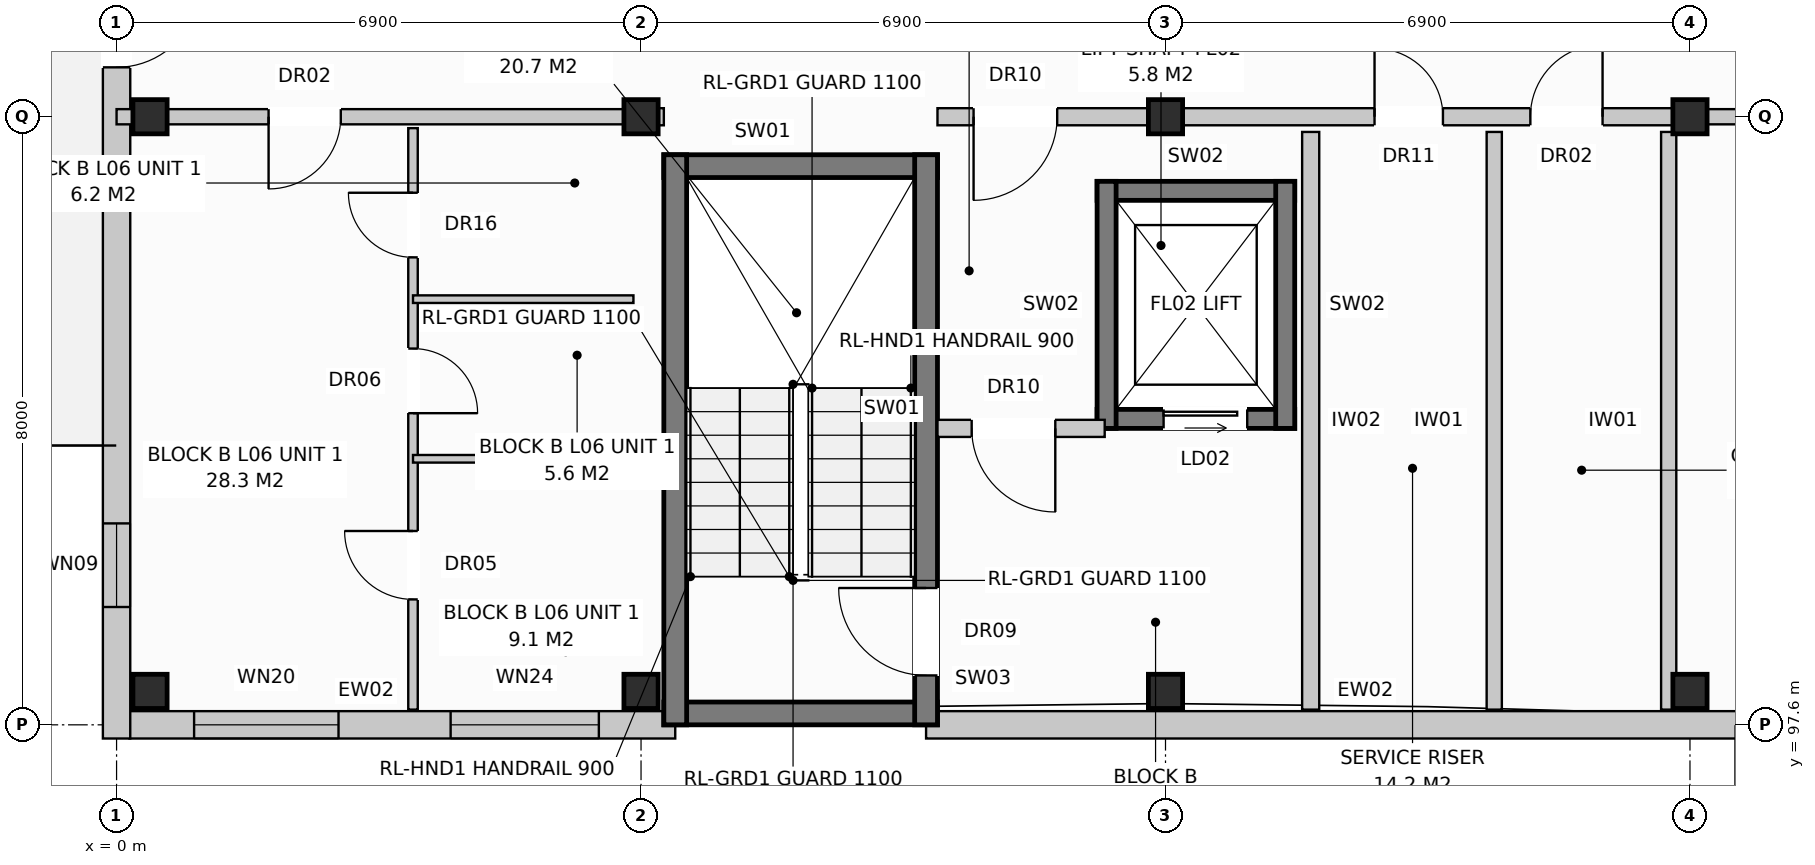
"""IFC4 building model, lengths in metres.
Left out: names, types, materials, properties, quantities, classifications, styles, units other than length and angle.
Written with IfcOpenShell. Run it as: python <this file> out.ifc"""

import sys

from ifc_helpers import new_model, si_unit, direction, frame, frame_2d, origin, origin_with_axes, origin_2d, place, context, subcontext, project, spatial, rectangle, extrude, element, fill, save


model = new_model("IFC4")
c1 = context("Model", 3, precision=1e-05, world=origin(), true_north=direction((0.0, 1.0)))
c2 = subcontext(c1, "Body", "Model", "MODEL_VIEW")
j1 = project(units=[si_unit("LENGTHUNIT", "METRE"), si_unit("PLANEANGLEUNIT", "RADIAN")], contexts=[c1])
p1 = place(None, origin())
s1 = spatial("IfcSite", under=j1, at=p1, CompositionType="ELEMENT")
p2 = place(p1, origin())
s2 = spatial("IfcBuilding", under=s1, at=p2, CompositionType="ELEMENT")
p3 = place(p2, frame((0.0, 0.0, 20.8)))
s3 = spatial("IfcBuildingStorey", under=s2, at=p3, CompositionType="ELEMENT", Elevation=20.8)
for number, where, z_axis, x_axis in (
    (1, (0.44, 98.04, 0.0), (0.0, 0.0, 1.0), (1.0, 0.0, 0.0)),
    (2, (0.44, 105.6, 0.0), (0.0, 0.0, 1.0), (1.0, 0.0, 0.0)),
    (3, (6.9, 98.04, 0.0), (0.0, 0.0, 1.0), (1.0, 0.0, 0.0)),
    (4, (6.9, 105.6, 0.0), (0.0, 0.0, 1.0), (1.0, 0.0, 0.0)),
    (5, (13.8, 98.04, 0.0), (0.0, 0.0, 1.0), (1.0, 0.0, 0.0)),
    (6, (13.8, 105.6, 0.0), (0.0, 0.0, 1.0), (1.0, 0.0, 0.0)),
    (7, (20.7, 98.04, 0.0), (0.0, 0.0, 1.0), (1.0, 0.0, 0.0)),
    (8, (20.7, 105.6, 0.0), (0.0, 0.0, 1.0), (1.0, 0.0, 0.0)),
):
    element("IfcColumn", number, at=place(p3, frame(where, z_axis=z_axis, x_axis=x_axis)), inside=s3, PredefinedType="COLUMN", context=c2, shape_type="SweptSolid", body=[
        extrude(rectangle(XDim=0.45, YDim=0.45, at=origin_2d()), origin(), (0.0, 0.0, 1.0), 3.2),
    ])
p4 = place(p3, frame((0.17, 97.6, 0.0), z_axis=(0.0, 0.0, 1.0), x_axis=(1.0, 0.0, 0.0)))
e9 = element("IfcWall", 9, at=p4, inside=s3, PredefinedType="STANDARD", context=c2, shape_type="SweptSolid", body=[
    extrude(rectangle(XDim=7.18, YDim=0.36, at=frame_2d((3.59, 0.0))), origin(), (0.0, 0.0, 1.0), 2.95),
])
p5 = place(p4, frame((0.85, 0.0, 0.8)))
e10 = element("IfcOpeningElement", 10, at=p5, cuts=e9, PredefinedType="OPENING", context=c2, shape_type="SweptSolid", body=[
    extrude(rectangle(XDim=1.9, YDim=1.85, at=frame_2d((0.95, 0.925))), frame((0.0, 0.192, 0.0), z_axis=(0.0, -1.0, 0.0), x_axis=(1.0, 0.0, 0.0)), (0.0, 0.0, 1.0), 0.384),
])
p6 = place(p4, frame((4.225, 0.0, 0.8)))
e11 = element("IfcOpeningElement", 11, at=p6, cuts=e9, PredefinedType="OPENING", context=c2, shape_type="SweptSolid", body=[
    extrude(rectangle(XDim=1.95, YDim=1.65, at=frame_2d((0.975, 0.825))), frame((0.0, 0.192, 0.0), z_axis=(0.0, -1.0, 0.0), x_axis=(1.0, 0.0, 0.0)), (0.0, 0.0, 1.0), 0.384),
])
p7 = place(p3, frame((10.65, 97.6, 0.0), z_axis=(0.0, 0.0, 1.0), x_axis=(1.0, 0.0, 0.0)))
e12 = element("IfcWall", 12, at=p7, inside=s3, PredefinedType="STANDARD", context=c2, shape_type="SweptSolid", body=[
    extrude(rectangle(XDim=17.4, YDim=0.36, at=frame_2d((8.7, 0.0))), origin(), (0.0, 0.0, 1.0), 2.95),
])
p8 = place(p7, frame((11.87, 0.0, 0.0)))
e13 = element("IfcOpeningElement", 13, at=p8, cuts=e12, PredefinedType="OPENING", context=c2, shape_type="SweptSolid", body=[
    extrude(rectangle(XDim=0.95, YDim=2.1, at=frame_2d((0.475, 1.05))), frame((0.0, 0.192, 0.0), z_axis=(0.0, -1.0, 0.0), x_axis=(1.0, 0.0, 0.0)), (0.0, 0.0, 1.0), 0.384),
])
p9 = place(p7, frame((14.87, 0.0, 0.72)))
e14 = element("IfcOpeningElement", 14, at=p9, cuts=e12, PredefinedType="OPENING", context=c2, shape_type="SweptSolid", body=[
    extrude(rectangle(XDim=1.1, YDim=1.5, at=frame_2d((0.55, 0.75))), frame((0.0, 0.192, 0.0), z_axis=(0.0, -1.0, 0.0), x_axis=(1.0, 0.0, 0.0)), (0.0, 0.0, 1.0), 0.384),
])
p10 = place(p3, frame((0.0, 97.42, 0.0), z_axis=(0.0, 0.0, 1.0), x_axis=(0.0, 1.0, 0.0)))
e15 = element("IfcWall", 15, at=p10, inside=s3, PredefinedType="STANDARD", context=c2, shape_type="SweptSolid", body=[
    extrude(rectangle(XDim=18.76, YDim=0.36, at=frame_2d((9.38, 0.0))), origin(), (0.0, 0.0, 1.0), 2.95),
])
p11 = place(p10, frame((8.83, 0.0, 0.0)))
e16 = element("IfcOpeningElement", 16, at=p11, cuts=e15, PredefinedType="OPENING", context=c2, shape_type="SweptSolid", body=[
    extrude(rectangle(XDim=1.1, YDim=2.1, at=frame_2d((0.55, 1.05))), frame((0.0, 0.192, 0.0), z_axis=(0.0, -1.0, 0.0), x_axis=(1.0, 0.0, 0.0)), (0.0, 0.0, 1.0), 0.384),
])
p12 = place(p10, frame((1.73, 0.0, 0.72)))
e17 = element("IfcOpeningElement", 17, at=p12, cuts=e15, PredefinedType="OPENING", context=c2, shape_type="SweptSolid", body=[
    extrude(rectangle(XDim=1.1, YDim=1.5, at=frame_2d((0.55, 0.75))), frame((0.0, 0.192, 0.0), z_axis=(0.0, -1.0, 0.0), x_axis=(1.0, 0.0, 0.0)), (0.0, 0.0, 1.0), 0.384),
])
p13 = place(p10, frame((15.93, 0.0, 0.72)))
e18 = element("IfcOpeningElement", 18, at=p13, cuts=e15, PredefinedType="OPENING", context=c2, shape_type="SweptSolid", body=[
    extrude(rectangle(XDim=1.1, YDim=1.5, at=frame_2d((0.55, 0.75))), frame((0.0, 0.192, 0.0), z_axis=(0.0, -1.0, 0.0), x_axis=(1.0, 0.0, 0.0)), (0.0, 0.0, 1.0), 0.384),
])
for number, where, z_axis, x_axis in (
    (19, (7.2, 97.75, 0.0), (0.0, 0.0, 1.0), (1.0, 0.0, 0.0)),
    (20, (7.2, 104.95, 0.0), (0.0, 0.0, 1.0), (1.0, 0.0, 0.0)),
):
    element("IfcWall", number, at=place(p3, frame(where, z_axis=z_axis, x_axis=x_axis)), inside=s3, PredefinedType="SHEAR", context=c2, shape_type="SweptSolid", body=[
        extrude(rectangle(XDim=3.6, YDim=0.3, at=frame_2d((1.8, 0.0))), origin(), (0.0, 0.0, 1.0), 2.95),
    ])
p14 = place(p3, frame((7.35, 97.6, 0.0), z_axis=(0.0, 0.0, 1.0), x_axis=(0.0, 1.0, 0.0)))
e21 = element("IfcWall", 21, at=p14, inside=s3, PredefinedType="SHEAR", context=c2, shape_type="SweptSolid", body=[
    extrude(rectangle(XDim=7.5, YDim=0.3, at=frame_2d((3.75, 0.0))), origin(), (0.0, 0.0, 1.0), 2.95),
])
p15 = place(p3, frame((10.65, 97.6, 0.0), z_axis=(0.0, 0.0, 1.0), x_axis=(0.0, 1.0, 0.0)))
e22 = element("IfcWall", 22, at=p15, inside=s3, PredefinedType="SHEAR", context=c2, shape_type="SweptSolid", body=[
    extrude(rectangle(XDim=7.5, YDim=0.3, at=frame_2d((3.75, 0.0))), origin(), (0.0, 0.0, 1.0), 2.95),
])
p16 = place(p15, frame((0.65, 0.0, 0.0)))
e23 = element("IfcOpeningElement", 23, at=p16, cuts=e22, PredefinedType="OPENING", context=c2, shape_type="SweptSolid", body=[
    extrude(rectangle(XDim=1.15, YDim=2.15, at=frame_2d((0.575, 1.075))), frame((0.0, 0.162, 0.0), z_axis=(0.0, -1.0, 0.0), x_axis=(1.0, 0.0, 0.0)), (0.0, 0.0, 1.0), 0.324),
])
p17 = place(p3, frame((12.9, 101.625, 0.0), z_axis=(0.0, 0.0, 1.0), x_axis=(1.0, 0.0, 0.0)))
e24 = element("IfcWall", 24, at=p17, inside=s3, PredefinedType="SHEAR", context=c2, shape_type="SweptSolid", body=[
    extrude(rectangle(XDim=2.6, YDim=0.25, at=frame_2d((1.3, 0.0))), origin(), (0.0, 0.0, 1.0), 2.95),
])
p18 = place(p17, frame((0.875, 0.0, 0.0)))
e25 = element("IfcOpeningElement", 25, at=p18, cuts=e24, PredefinedType="OPENING", context=c2, shape_type="SweptSolid", body=[
    extrude(rectangle(XDim=1.1, YDim=2.1, at=frame_2d((0.55, 1.05))), frame((0.0, 0.137, 0.0), z_axis=(0.0, -1.0, 0.0), x_axis=(1.0, 0.0, 0.0)), (0.0, 0.0, 1.0), 0.274),
])
p19 = place(p3, frame((12.9, 104.625, 0.0), z_axis=(0.0, 0.0, 1.0), x_axis=(1.0, 0.0, 0.0)))
e26 = element("IfcWall", 26, at=p19, inside=s3, PredefinedType="SHEAR", context=c2, shape_type="SweptSolid", body=[
    extrude(rectangle(XDim=2.6, YDim=0.25, at=frame_2d((1.3, 0.0))), origin(), (0.0, 0.0, 1.0), 2.95),
])
for number, where, z_axis, x_axis in (
    (27, (13.025, 101.5, 0.0), (0.0, 0.0, 1.0), (0.0, 1.0, 0.0)),
    (28, (15.375, 101.5, 0.0), (0.0, 0.0, 1.0), (0.0, 1.0, 0.0)),
):
    element("IfcWall", number, at=place(p3, frame(where, z_axis=z_axis, x_axis=x_axis)), inside=s3, PredefinedType="SHEAR", context=c2, shape_type="SweptSolid", body=[
        extrude(rectangle(XDim=3.25, YDim=0.25, at=frame_2d((1.625, 0.0))), origin(), (0.0, 0.0, 1.0), 2.95),
    ])
p20 = place(p3, frame((15.71, 97.8, 0.0), z_axis=(0.0, 0.0, 1.0), x_axis=(0.0, 1.0, 0.0)))
e29 = element("IfcWall", 29, at=p20, inside=s3, PredefinedType="PARTITIONING", context=c2, shape_type="SweptSolid", body=[
    extrude(rectangle(XDim=7.6, YDim=0.225, at=frame_2d((3.8, 0.0))), origin(), (0.0, 0.0, 1.0), 2.59),
])
p21 = place(p3, frame((10.8, 101.5, 0.0), z_axis=(0.0, 0.0, 1.0), x_axis=(1.0, 0.0, 0.0)))
e30 = element("IfcWall", 30, at=p21, inside=s3, PredefinedType="PARTITIONING", context=c2, shape_type="SweptSolid", body=[
    extrude(rectangle(XDim=2.2, YDim=0.225, at=frame_2d((1.1, 0.0))), origin(), (0.0, 0.0, 1.0), 2.95),
])
p22 = place(p21, frame((0.45, 0.0, 0.0)))
e31 = element("IfcOpeningElement", 31, at=p22, cuts=e30, PredefinedType="OPENING", context=c2, shape_type="SweptSolid", body=[
    extrude(rectangle(XDim=1.1, YDim=2.15, at=frame_2d((0.55, 1.075))), frame((0.0, 0.125, 0.0), z_axis=(0.0, -1.0, 0.0), x_axis=(1.0, 0.0, 0.0)), (0.0, 0.0, 1.0), 0.249),
])
p23 = place(p3, frame((6.9, 105.6, 0.0), z_axis=(0.0, 0.0, 1.0), x_axis=(1.0, 0.0, 0.0)))
e32 = element("IfcWall", 32, at=p23, inside=s3, PredefinedType="PARTITIONING", context=c2, shape_type="SweptSolid", body=[
    extrude(rectangle(XDim=0.3, YDim=0.225, at=frame_2d((0.15, 0.0))), origin(), (0.0, 0.0, 1.0), 2.95),
])
for number, where, z_axis, x_axis in (
    (33, (18.125, 97.8, 0.0), (0.0, 0.0, 1.0), (0.0, 1.0, 0.0)),
    (34, (20.42, 97.8, 0.0), (0.0, 0.0, 1.0), (0.0, 1.0, 0.0)),
):
    element("IfcWall", number, at=place(p3, frame(where, z_axis=z_axis, x_axis=x_axis)), inside=s3, PredefinedType="PARTITIONING", context=c2, shape_type="SweptSolid", body=[
        extrude(rectangle(XDim=7.6, YDim=0.2, at=frame_2d((3.8, 0.0))), origin(), (0.0, 0.0, 1.0), 2.95),
    ])
p24 = place(p3, frame((10.8, 105.6, 0.0), z_axis=(0.0, 0.0, 1.0), x_axis=(1.0, 0.0, 0.0)))
e35 = element("IfcWall", 35, at=p24, inside=s3, PredefinedType="PARTITIONING", context=c2, shape_type="SweptSolid", body=[
    extrude(rectangle(XDim=9.9, YDim=0.225, at=frame_2d((4.95, 0.0))), origin(), (0.0, 0.0, 1.0), 2.39),
])
p25 = place(p24, frame((0.475, 0.0, 0.0)))
e36 = element("IfcOpeningElement", 36, at=p25, cuts=e35, PredefinedType="OPENING", context=c2, shape_type="SweptSolid", body=[
    extrude(rectangle(XDim=1.1, YDim=2.15, at=frame_2d((0.55, 1.075))), frame((0.0, 0.125, 0.0), z_axis=(0.0, -1.0, 0.0), x_axis=(1.0, 0.0, 0.0)), (0.0, 0.0, 1.0), 0.249),
])
p26 = place(p24, frame((5.75, 0.0, 0.0)))
e37 = element("IfcOpeningElement", 37, at=p26, cuts=e35, PredefinedType="OPENING", context=c2, shape_type="SweptSolid", body=[
    extrude(rectangle(XDim=0.9, YDim=2.1, at=frame_2d((0.45, 1.05))), frame((0.0, 0.125, 0.0), z_axis=(0.0, -1.0, 0.0), x_axis=(1.0, 0.0, 0.0)), (0.0, 0.0, 1.0), 0.249),
])
p27 = place(p24, frame((7.8, 0.0, 0.0)))
e38 = element("IfcOpeningElement", 38, at=p27, cuts=e35, PredefinedType="OPENING", context=c2, shape_type="SweptSolid", body=[
    extrude(rectangle(XDim=0.95, YDim=2.15, at=frame_2d((0.475, 1.075))), frame((0.0, 0.125, 0.0), z_axis=(0.0, -1.0, 0.0), x_axis=(1.0, 0.0, 0.0)), (0.0, 0.0, 1.0), 0.249),
])
p28 = place(p3, frame((0.0, 105.6, 0.0), z_axis=(0.0, 0.0, 1.0), x_axis=(1.0, 0.0, 0.0)))
e39 = element("IfcWall", 39, at=p28, inside=s3, PredefinedType="PARTITIONING", context=c2, shape_type="SweptSolid", body=[
    extrude(rectangle(XDim=6.9, YDim=0.2, at=frame_2d((3.45, 0.0))), origin(), (0.0, 0.0, 1.0), 2.39),
])
p29 = place(p28, frame((2.0, 0.0, 0.0)))
e40 = element("IfcOpeningElement", 40, at=p29, cuts=e39, PredefinedType="OPENING", context=c2, shape_type="SweptSolid", body=[
    extrude(rectangle(XDim=0.95, YDim=2.15, at=frame_2d((0.475, 1.075))), frame((0.0, 0.112, 0.0), z_axis=(0.0, -1.0, 0.0), x_axis=(1.0, 0.0, 0.0)), (0.0, 0.0, 1.0), 0.224),
])
p30 = place(p3, frame((3.9, 105.45, 0.0), z_axis=(0.0, 0.0, 1.0), x_axis=(0.0, -1.0, 0.0)))
e41 = element("IfcWall", 41, at=p30, inside=s3, PredefinedType="PARTITIONING", context=c2, shape_type="SweptSolid", body=[
    extrude(rectangle(XDim=7.65, YDim=0.125, at=frame_2d((3.825, 0.0))), origin(), (0.0, 0.0, 1.0), 2.95),
])
p31 = place(p30, frame((0.85, 0.0, 0.0)))
e42 = element("IfcOpeningElement", 42, at=p31, cuts=e41, PredefinedType="OPENING", context=c2, shape_type="SweptSolid", body=[
    extrude(rectangle(XDim=0.85, YDim=2.1, at=frame_2d((0.425, 1.05))), frame((0.0, 0.074, 0.0), z_axis=(0.0, -1.0, 0.0), x_axis=(1.0, 0.0, 0.0)), (0.0, 0.0, 1.0), 0.149),
])
p32 = place(p30, frame((2.9, 0.0, 0.0)))
e43 = element("IfcOpeningElement", 43, at=p32, cuts=e41, PredefinedType="OPENING", context=c2, shape_type="SweptSolid", body=[
    extrude(rectangle(XDim=0.85, YDim=2.05, at=frame_2d((0.425, 1.025))), frame((0.0, 0.074, 0.0), z_axis=(0.0, -1.0, 0.0), x_axis=(1.0, 0.0, 0.0)), (0.0, 0.0, 1.0), 0.149),
])
p33 = place(p30, frame((5.3, 0.0, 0.0)))
e44 = element("IfcOpeningElement", 44, at=p33, cuts=e41, PredefinedType="OPENING", context=c2, shape_type="SweptSolid", body=[
    extrude(rectangle(XDim=0.9, YDim=2.1, at=frame_2d((0.45, 1.05))), frame((0.0, 0.074, 0.0), z_axis=(0.0, -1.0, 0.0), x_axis=(1.0, 0.0, 0.0)), (0.0, 0.0, 1.0), 0.149),
])
for number, where, z_axis, x_axis in (
    (45, (3.9, 103.2, 0.0), (0.0, 0.0, 1.0), (1.0, 0.0, 0.0)),
    (46, (3.9, 101.1, 0.0), (0.0, 0.0, 1.0), (1.0, 0.0, 0.0)),
):
    element("IfcWall", number, at=place(p3, frame(where, z_axis=z_axis, x_axis=x_axis)), inside=s3, PredefinedType="PARTITIONING", context=c2, shape_type="SweptSolid", body=[
        extrude(rectangle(XDim=2.9, YDim=0.1, at=frame_2d((1.45, 0.0))), origin(), (0.0, 0.0, 1.0), 2.95),
    ])
p34 = place(p3, frame((20.7, 105.6, 0.0), z_axis=(0.0, 0.0, 1.0), x_axis=(1.0, 0.0, 0.0)))
e47 = element("IfcWall", 47, at=p34, inside=s3, PredefinedType="PARTITIONING", context=c2, shape_type="SweptSolid", body=[
    extrude(rectangle(XDim=6.9, YDim=0.2, at=frame_2d((3.45, 0.0))), origin(), (0.0, 0.0, 1.0), 2.39),
])
p35 = place(p34, frame((2.0, 0.0, 0.0)))
e48 = element("IfcOpeningElement", 48, at=p35, cuts=e47, PredefinedType="OPENING", context=c2, shape_type="SweptSolid", body=[
    extrude(rectangle(XDim=0.95, YDim=2.15, at=frame_2d((0.475, 1.075))), frame((0.0, 0.112, 0.0), z_axis=(0.0, -1.0, 0.0), x_axis=(1.0, 0.0, 0.0)), (0.0, 0.0, 1.0), 0.224),
])
p36 = place(p5, origin_with_axes())
e49 = element("IfcWindow", 49, at=p36, inside=s3, PartitioningType="SINGLE_PANEL", PredefinedType="WINDOW", context=c2, shape_type="SweptSolid", body=[
    extrude(rectangle(XDim=1.9, YDim=1.85, at=frame_2d((0.95, 0.925))), frame((0.0, 0.03, 0.0), z_axis=(0.0, -1.0, 0.0), x_axis=(1.0, 0.0, 0.0)), (0.0, 0.0, 1.0), 0.06),
])
fill(e10, e49)
p37 = place(p6, origin_with_axes())
e50 = element("IfcWindow", 50, at=p37, inside=s3, PartitioningType="SINGLE_PANEL", PredefinedType="WINDOW", context=c2, shape_type="SweptSolid", body=[
    extrude(rectangle(XDim=1.95, YDim=1.65, at=frame_2d((0.975, 0.825))), frame((0.0, 0.03, 0.0), z_axis=(0.0, -1.0, 0.0), x_axis=(1.0, 0.0, 0.0)), (0.0, 0.0, 1.0), 0.06),
])
fill(e11, e50)
p38 = place(p11, frame((1.1, 0.0, 0.0), z_axis=(0.0, 0.0, 1.0), x_axis=(-1.0, 0.0, 0.0)))
e51 = element("IfcDoor", 51, at=p38, inside=s3, OperationType="SINGLE_SWING_RIGHT", PredefinedType="DOOR", context=c2, shape_type="SweptSolid", body=[
    extrude(rectangle(XDim=1.1, YDim=2.1, at=frame_2d((0.55, 1.05))), frame((0.0, 0.025, 0.0), z_axis=(0.0, -1.0, 0.0), x_axis=(1.0, 0.0, 0.0)), (0.0, 0.0, 1.0), 0.05),
])
fill(e16, e51)
p39 = place(p12, origin_with_axes())
e52 = element("IfcWindow", 52, at=p39, inside=s3, PartitioningType="SINGLE_PANEL", PredefinedType="WINDOW", context=c2, shape_type="SweptSolid", body=[
    extrude(rectangle(XDim=1.1, YDim=1.5, at=frame_2d((0.55, 0.75))), frame((0.0, 0.03, 0.0), z_axis=(0.0, -1.0, 0.0), x_axis=(1.0, 0.0, 0.0)), (0.0, 0.0, 1.0), 0.06),
])
fill(e17, e52)
p40 = place(p16, origin_with_axes())
e53 = element("IfcDoor", 53, at=p40, inside=s3, OperationType="SINGLE_SWING_RIGHT", PredefinedType="DOOR", context=c2, shape_type="SweptSolid", body=[
    extrude(rectangle(XDim=1.15, YDim=2.15, at=frame_2d((0.575, 1.075))), frame((0.0, 0.025, 0.0), z_axis=(0.0, -1.0, 0.0), x_axis=(1.0, 0.0, 0.0)), (0.0, 0.0, 1.0), 0.05),
])
fill(e23, e53)
p41 = place(p18, origin_with_axes())
e54 = element("IfcDoor", 54, at=p41, inside=s3, OperationType="SLIDING_TO_LEFT", PredefinedType="DOOR", context=c2, shape_type="SweptSolid", body=[
    extrude(rectangle(XDim=1.1, YDim=2.1, at=frame_2d((0.55, 1.05))), frame((0.0, 0.025, 0.0), z_axis=(0.0, -1.0, 0.0), x_axis=(1.0, 0.0, 0.0)), (0.0, 0.0, 1.0), 0.05),
])
fill(e25, e54)
p42 = place(p22, frame((1.1, 0.0, 0.0), z_axis=(0.0, 0.0, 1.0), x_axis=(-1.0, 0.0, 0.0)))
e55 = element("IfcDoor", 55, at=p42, inside=s3, OperationType="SINGLE_SWING_RIGHT", PredefinedType="DOOR", context=c2, shape_type="SweptSolid", body=[
    extrude(rectangle(XDim=1.1, YDim=2.15, at=frame_2d((0.55, 1.075))), frame((0.0, 0.025, 0.0), z_axis=(0.0, -1.0, 0.0), x_axis=(1.0, 0.0, 0.0)), (0.0, 0.0, 1.0), 0.05),
])
fill(e31, e55)
p43 = place(p25, frame((1.1, 0.0, 0.0), z_axis=(0.0, 0.0, 1.0), x_axis=(-1.0, 0.0, 0.0)))
e56 = element("IfcDoor", 56, at=p43, inside=s3, OperationType="SINGLE_SWING_LEFT", PredefinedType="DOOR", context=c2, shape_type="SweptSolid", body=[
    extrude(rectangle(XDim=1.1, YDim=2.15, at=frame_2d((0.55, 1.075))), frame((0.0, 0.025, 0.0), z_axis=(0.0, -1.0, 0.0), x_axis=(1.0, 0.0, 0.0)), (0.0, 0.0, 1.0), 0.05),
])
fill(e36, e56)
p44 = place(p26, origin_with_axes())
e57 = element("IfcDoor", 57, at=p44, inside=s3, OperationType="SINGLE_SWING_LEFT", PredefinedType="DOOR", context=c2, shape_type="SweptSolid", body=[
    extrude(rectangle(XDim=0.9, YDim=2.1, at=frame_2d((0.45, 1.05))), frame((0.0, 0.025, 0.0), z_axis=(0.0, -1.0, 0.0), x_axis=(1.0, 0.0, 0.0)), (0.0, 0.0, 1.0), 0.05),
])
fill(e37, e57)
p45 = place(p27, origin_with_axes())
e58 = element("IfcDoor", 58, at=p45, inside=s3, OperationType="SINGLE_SWING_RIGHT", PredefinedType="DOOR", context=c2, shape_type="SweptSolid", body=[
    extrude(rectangle(XDim=0.95, YDim=2.15, at=frame_2d((0.475, 1.075))), frame((0.0, 0.025, 0.0), z_axis=(0.0, -1.0, 0.0), x_axis=(1.0, 0.0, 0.0)), (0.0, 0.0, 1.0), 0.05),
])
fill(e38, e58)
p46 = place(p29, frame((0.95, 0.0, 0.0), z_axis=(0.0, 0.0, 1.0), x_axis=(-1.0, 0.0, 0.0)))
e59 = element("IfcDoor", 59, at=p46, inside=s3, OperationType="SINGLE_SWING_LEFT", PredefinedType="DOOR", context=c2, shape_type="SweptSolid", body=[
    extrude(rectangle(XDim=0.95, YDim=2.15, at=frame_2d((0.475, 1.075))), frame((0.0, 0.025, 0.0), z_axis=(0.0, -1.0, 0.0), x_axis=(1.0, 0.0, 0.0)), (0.0, 0.0, 1.0), 0.05),
])
fill(e40, e59)
p47 = place(p31, frame((0.85, 0.0, 0.0), z_axis=(0.0, 0.0, 1.0), x_axis=(-1.0, 0.0, 0.0)))
e60 = element("IfcDoor", 60, at=p47, inside=s3, OperationType="SINGLE_SWING_LEFT", PredefinedType="DOOR", context=c2, shape_type="SweptSolid", body=[
    extrude(rectangle(XDim=0.85, YDim=2.1, at=frame_2d((0.425, 1.05))), frame((0.0, 0.025, 0.0), z_axis=(0.0, -1.0, 0.0), x_axis=(1.0, 0.0, 0.0)), (0.0, 0.0, 1.0), 0.05),
])
fill(e42, e60)
p48 = place(p32, origin_with_axes())
e61 = element("IfcDoor", 61, at=p48, inside=s3, OperationType="SINGLE_SWING_RIGHT", PredefinedType="DOOR", context=c2, shape_type="SweptSolid", body=[
    extrude(rectangle(XDim=0.85, YDim=2.05, at=frame_2d((0.425, 1.025))), frame((0.0, 0.025, 0.0), z_axis=(0.0, -1.0, 0.0), x_axis=(1.0, 0.0, 0.0)), (0.0, 0.0, 1.0), 0.05),
])
fill(e43, e61)
p49 = place(p33, frame((0.9, 0.0, 0.0), z_axis=(0.0, 0.0, 1.0), x_axis=(-1.0, 0.0, 0.0)))
e62 = element("IfcDoor", 62, at=p49, inside=s3, OperationType="SINGLE_SWING_LEFT", PredefinedType="DOOR", context=c2, shape_type="SweptSolid", body=[
    extrude(rectangle(XDim=0.9, YDim=2.1, at=frame_2d((0.45, 1.05))), frame((0.0, 0.025, 0.0), z_axis=(0.0, -1.0, 0.0), x_axis=(1.0, 0.0, 0.0)), (0.0, 0.0, 1.0), 0.05),
])
fill(e44, e62)
save(model, sys.argv[1])
